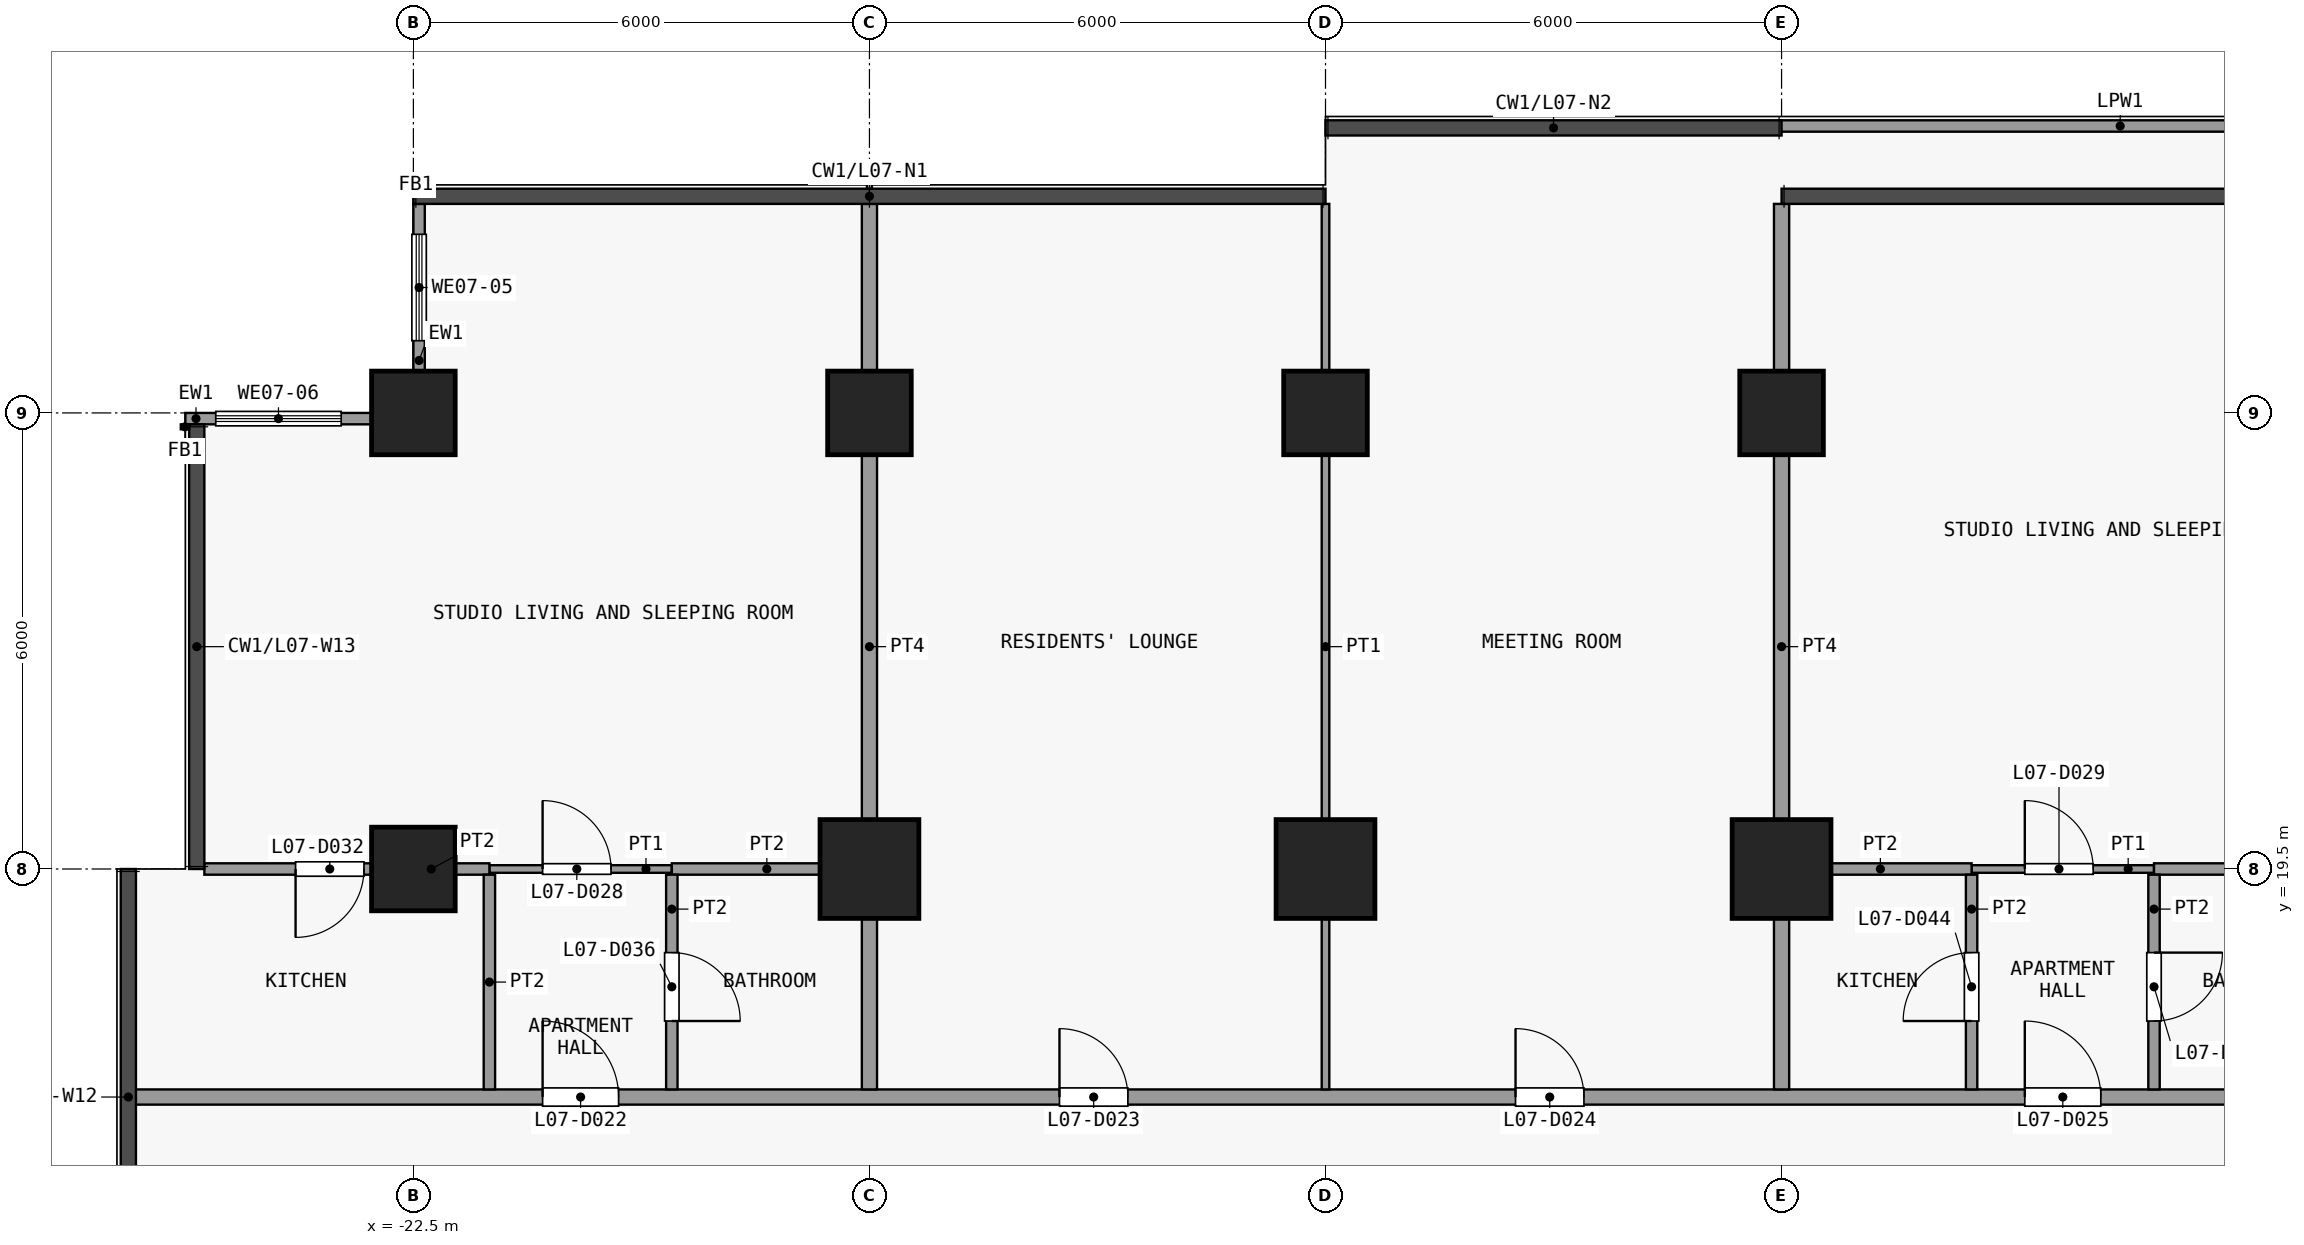
"""IFC4 building model, lengths in metres.
Left out: names, types, materials, properties, quantities, classifications, styles, units other than length and angle.
Written with IfcOpenShell. Run it as: python <this file> out.ifc"""

import sys

from ifc_helpers import new_model, si_unit, direction, frame, frame_2d, origin, origin_2d, place, context, subcontext, project, spatial, rectangle, extrude, element, fill, save


model = new_model("IFC4")
c1 = context("Model", 3, precision=1e-05, world=origin(), true_north=direction((0.0, 1.0)))
c2 = subcontext(c1, "Body", "Model", "MODEL_VIEW")
j1 = project(units=[si_unit("LENGTHUNIT", "METRE"), si_unit("PLANEANGLEUNIT", "RADIAN")], contexts=[c1])
p1 = place(None, origin())
s1 = spatial("IfcSite", under=j1, at=p1, CompositionType="ELEMENT")
p2 = place(p1, origin())
s2 = spatial("IfcBuilding", under=s1, at=p2, CompositionType="ELEMENT")
p3 = place(p2, frame((0.0, 0.0, 36.1)))
s3 = spatial("IfcBuildingStorey", under=s2, at=p3, CompositionType="ELEMENT", Elevation=36.1)
for number, where, z_axis, x_axis in (
    (1, (-22.5, 19.5, 0.0), (0.0, 0.0, 1.0), (1.0, 0.0, 0.0)),
    (2, (-22.5, 25.5, 0.0), (0.0, 0.0, 1.0), (1.0, 0.0, 0.0)),
):
    element("IfcColumn", number, at=place(p3, frame(where, z_axis=z_axis, x_axis=x_axis)), inside=s3, PredefinedType="COLUMN", context=c2, shape_type="SweptSolid", body=[
        extrude(rectangle(XDim=1.1, YDim=1.1, at=origin_2d()), origin(), (0.0, 0.0, 1.0), 3.6),
    ])
p4 = place(p3, frame((-16.5, 19.5, 0.0), z_axis=(0.0, 0.0, 1.0), x_axis=(1.0, 0.0, 0.0)))
e3 = element("IfcColumn", 3, at=p4, inside=s3, PredefinedType="COLUMN", context=c2, shape_type="SweptSolid", body=[
    extrude(rectangle(XDim=1.3, YDim=1.3, at=origin_2d()), origin(), (0.0, 0.0, 1.0), 3.6),
])
p5 = place(p3, frame((-16.5, 25.5, 0.0), z_axis=(0.0, 0.0, 1.0), x_axis=(1.0, 0.0, 0.0)))
e4 = element("IfcColumn", 4, at=p5, inside=s3, PredefinedType="COLUMN", context=c2, shape_type="SweptSolid", body=[
    extrude(rectangle(XDim=1.1, YDim=1.1, at=origin_2d()), origin(), (0.0, 0.0, 1.0), 3.6),
])
p6 = place(p3, frame((-10.5, 19.5, 0.0), z_axis=(0.0, 0.0, 1.0), x_axis=(1.0, 0.0, 0.0)))
e5 = element("IfcColumn", 5, at=p6, inside=s3, PredefinedType="COLUMN", context=c2, shape_type="SweptSolid", body=[
    extrude(rectangle(XDim=1.3, YDim=1.3, at=origin_2d()), origin(), (0.0, 0.0, 1.0), 3.6),
])
p7 = place(p3, frame((-10.5, 25.5, 0.0), z_axis=(0.0, 0.0, 1.0), x_axis=(1.0, 0.0, 0.0)))
e6 = element("IfcColumn", 6, at=p7, inside=s3, PredefinedType="COLUMN", context=c2, shape_type="SweptSolid", body=[
    extrude(rectangle(XDim=1.1, YDim=1.1, at=origin_2d()), origin(), (0.0, 0.0, 1.0), 3.6),
])
p8 = place(p3, frame((-4.5, 19.5, 0.0), z_axis=(0.0, 0.0, 1.0), x_axis=(1.0, 0.0, 0.0)))
e7 = element("IfcColumn", 7, at=p8, inside=s3, PredefinedType="COLUMN", context=c2, shape_type="SweptSolid", body=[
    extrude(rectangle(XDim=1.3, YDim=1.3, at=origin_2d()), origin(), (0.0, 0.0, 1.0), 3.6),
])
p9 = place(p3, frame((-4.5, 25.5, 0.0), z_axis=(0.0, 0.0, 1.0), x_axis=(1.0, 0.0, 0.0)))
e8 = element("IfcColumn", 8, at=p9, inside=s3, PredefinedType="COLUMN", context=c2, shape_type="SweptSolid", body=[
    extrude(rectangle(XDim=1.1, YDim=1.1, at=origin_2d()), origin(), (0.0, 0.0, 1.0), 3.6),
])
p10 = place(p3, frame((-22.425, 26.05, 0.0), z_axis=(0.0, 0.0, 1.0), x_axis=(0.0, 1.0, 0.0)))
e9 = element("IfcWall", 9, at=p10, inside=s3, PredefinedType="SOLIDWALL", context=c2, shape_type="SweptSolid", body=[
    extrude(rectangle(XDim=2.2, YDim=0.15, at=frame_2d((1.1, 0.0))), origin(), (0.0, 0.0, 1.0), 3.3),
])
p11 = place(p10, frame((0.4, 0.0, 0.9)))
e10 = element("IfcOpeningElement", 10, at=p11, cuts=e9, PredefinedType="OPENING", context=c2, shape_type="SweptSolid", body=[
    extrude(rectangle(XDim=1.4, YDim=2.4, at=frame_2d((0.7, 1.2))), frame((0.0, 0.085, 0.0), z_axis=(0.0, -1.0, 0.0), x_axis=(1.0, 0.0, 0.0)), (0.0, 0.0, 1.0), 0.17),
])
p12 = place(p3, frame((-25.5, 25.425, 0.0), z_axis=(0.0, 0.0, 1.0), x_axis=(1.0, 0.0, 0.0)))
e11 = element("IfcWall", 11, at=p12, inside=s3, PredefinedType="SOLIDWALL", context=c2, shape_type="SweptSolid", body=[
    extrude(rectangle(XDim=2.45, YDim=0.15, at=frame_2d((1.225, 0.0))), origin(), (0.0, 0.0, 1.0), 3.3),
])
p13 = place(p12, frame((0.4, 0.0, 0.9)))
e12 = element("IfcOpeningElement", 12, at=p13, cuts=e11, PredefinedType="OPENING", context=c2, shape_type="SweptSolid", body=[
    extrude(rectangle(XDim=1.65, YDim=2.4, at=frame_2d((0.825, 1.2))), frame((0.0, 0.085, 0.0), z_axis=(0.0, -1.0, 0.0), x_axis=(1.0, 0.0, 0.0)), (0.0, 0.0, 1.0), 0.17),
])
p14 = place(p3, frame((-4.54, 29.275, 0.0), z_axis=(0.0, 0.0, 1.0), x_axis=(1.0, 0.0, 0.0)))
e13 = element("IfcWall", 13, at=p14, inside=s3, PredefinedType="PARAPET", context=c2, shape_type="SweptSolid", body=[
    extrude(rectangle(XDim=8.99, YDim=0.15, at=frame_2d((4.495, 0.0))), origin(), (0.0, 0.0, 1.0), 1.15),
])
p15 = place(p3, frame((-26.25, 16.5, 0.0), z_axis=(0.0, 0.0, 1.0), x_axis=(1.0, 0.0, 0.0)))
e14 = element("IfcWall", 14, at=p15, inside=s3, PredefinedType="PARTITIONING", context=c2, shape_type="SweptSolid", body=[
    extrude(rectangle(XDim=51.6, YDim=0.2, at=frame_2d((25.8, 0.0))), origin(), (0.0, 0.0, 1.0), 3.3),
])
p16 = place(p15, frame((5.45, 0.0, 0.0)))
e15 = element("IfcOpeningElement", 15, at=p16, cuts=e14, PredefinedType="OPENING", context=c2, shape_type="SweptSolid", body=[
    extrude(rectangle(XDim=1.0, YDim=2.1, at=frame_2d((0.5, 1.05))), frame((0.0, 0.11, 0.0), z_axis=(0.0, -1.0, 0.0), x_axis=(1.0, 0.0, 0.0)), (0.0, 0.0, 1.0), 0.22),
])
p17 = place(p15, frame((12.25, 0.0, 0.0)))
e16 = element("IfcOpeningElement", 16, at=p17, cuts=e14, PredefinedType="OPENING", context=c2, shape_type="SweptSolid", body=[
    extrude(rectangle(XDim=0.9, YDim=2.1, at=frame_2d((0.45, 1.05))), frame((0.0, 0.11, 0.0), z_axis=(0.0, -1.0, 0.0), x_axis=(1.0, 0.0, 0.0)), (0.0, 0.0, 1.0), 0.22),
])
p18 = place(p15, frame((18.25, 0.0, 0.0)))
e17 = element("IfcOpeningElement", 17, at=p18, cuts=e14, PredefinedType="OPENING", context=c2, shape_type="SweptSolid", body=[
    extrude(rectangle(XDim=0.9, YDim=2.1, at=frame_2d((0.45, 1.05))), frame((0.0, 0.11, 0.0), z_axis=(0.0, -1.0, 0.0), x_axis=(1.0, 0.0, 0.0)), (0.0, 0.0, 1.0), 0.22),
])
p19 = place(p15, frame((24.95, 0.0, 0.0)))
e18 = element("IfcOpeningElement", 18, at=p19, cuts=e14, PredefinedType="OPENING", context=c2, shape_type="SweptSolid", body=[
    extrude(rectangle(XDim=1.0, YDim=2.1, at=frame_2d((0.5, 1.05))), frame((0.0, 0.11, 0.0), z_axis=(0.0, -1.0, 0.0), x_axis=(1.0, 0.0, 0.0)), (0.0, 0.0, 1.0), 0.22),
])
p20 = place(p15, frame((31.45, 0.0, 0.0)))
e19 = element("IfcOpeningElement", 19, at=p20, cuts=e14, PredefinedType="OPENING", context=c2, shape_type="SweptSolid", body=[
    extrude(rectangle(XDim=1.0, YDim=2.1, at=frame_2d((0.5, 1.05))), frame((0.0, 0.11, 0.0), z_axis=(0.0, -1.0, 0.0), x_axis=(1.0, 0.0, 0.0)), (0.0, 0.0, 1.0), 0.22),
])
p21 = place(p15, frame((43.45, 0.0, 0.0)))
e20 = element("IfcOpeningElement", 20, at=p21, cuts=e14, PredefinedType="OPENING", context=c2, shape_type="SweptSolid", body=[
    extrude(rectangle(XDim=1.0, YDim=2.1, at=frame_2d((0.5, 1.05))), frame((0.0, 0.11, 0.0), z_axis=(0.0, -1.0, 0.0), x_axis=(1.0, 0.0, 0.0)), (0.0, 0.0, 1.0), 0.22),
])
p22 = place(p3, frame((-21.5, 19.5, 0.0), z_axis=(0.0, 0.0, 1.0), x_axis=(1.0, 0.0, 0.0)))
e21 = element("IfcWall", 21, at=p22, inside=s3, PredefinedType="PARTITIONING", context=c2, shape_type="SweptSolid", body=[
    extrude(rectangle(XDim=2.4, YDim=0.1, at=frame_2d((1.2, 0.0))), origin(), (0.0, 0.0, 1.0), 3.3),
])
p23 = place(p22, frame((0.7, 0.0, 0.0)))
e22 = element("IfcOpeningElement", 22, at=p23, cuts=e21, PredefinedType="OPENING", context=c2, shape_type="SweptSolid", body=[
    extrude(rectangle(XDim=0.9, YDim=2.1, at=frame_2d((0.45, 1.05))), frame((0.0, 0.06, 0.0), z_axis=(0.0, -1.0, 0.0), x_axis=(1.0, 0.0, 0.0)), (0.0, 0.0, 1.0), 0.12),
])
p24 = place(p3, frame((-2.0, 19.5, 0.0), z_axis=(0.0, 0.0, 1.0), x_axis=(1.0, 0.0, 0.0)))
e23 = element("IfcWall", 23, at=p24, inside=s3, PredefinedType="PARTITIONING", context=c2, shape_type="SweptSolid", body=[
    extrude(rectangle(XDim=2.4, YDim=0.1, at=frame_2d((1.2, 0.0))), origin(), (0.0, 0.0, 1.0), 3.3),
])
p25 = place(p24, frame((0.7, 0.0, 0.0)))
e24 = element("IfcOpeningElement", 24, at=p25, cuts=e23, PredefinedType="OPENING", context=c2, shape_type="SweptSolid", body=[
    extrude(rectangle(XDim=0.9, YDim=2.1, at=frame_2d((0.45, 1.05))), frame((0.0, 0.06, 0.0), z_axis=(0.0, -1.0, 0.0), x_axis=(1.0, 0.0, 0.0)), (0.0, 0.0, 1.0), 0.12),
])
p26 = place(p3, frame((-25.25, 19.5, 0.0), z_axis=(0.0, 0.0, 1.0), x_axis=(1.0, 0.0, 0.0)))
e25 = element("IfcWall", 25, at=p26, inside=s3, PredefinedType="PARTITIONING", context=c2, shape_type="SweptSolid", body=[
    extrude(rectangle(XDim=3.75, YDim=0.15, at=frame_2d((1.875, 0.0))), origin(), (0.0, 0.0, 1.0), 3.3),
])
p27 = place(p26, frame((1.2, 0.0, 0.0)))
e26 = element("IfcOpeningElement", 26, at=p27, cuts=e25, PredefinedType="OPENING", context=c2, shape_type="SweptSolid", body=[
    extrude(rectangle(XDim=0.9, YDim=2.1, at=frame_2d((0.45, 1.05))), frame((0.0, 0.085, 0.0), z_axis=(0.0, -1.0, 0.0), x_axis=(1.0, 0.0, 0.0)), (0.0, 0.0, 1.0), 0.17),
])
p28 = place(p3, frame((-19.1, 19.5, 0.0), z_axis=(0.0, 0.0, 1.0), x_axis=(1.0, 0.0, 0.0)))
e27 = element("IfcWall", 27, at=p28, inside=s3, PredefinedType="PARTITIONING", context=c2, shape_type="SweptSolid", body=[
    extrude(rectangle(XDim=2.5, YDim=0.15, at=frame_2d((1.25, 0.0))), origin(), (0.0, 0.0, 1.0), 3.3),
])
p29 = place(p3, frame((-4.4, 19.5, 0.0), z_axis=(0.0, 0.0, 1.0), x_axis=(1.0, 0.0, 0.0)))
e28 = element("IfcWall", 28, at=p29, inside=s3, PredefinedType="PARTITIONING", context=c2, shape_type="SweptSolid", body=[
    extrude(rectangle(XDim=2.4, YDim=0.15, at=frame_2d((1.2, 0.0))), origin(), (0.0, 0.0, 1.0), 3.3),
])
p30 = place(p3, frame((0.4, 19.5, 0.0), z_axis=(0.0, 0.0, 1.0), x_axis=(1.0, 0.0, 0.0)))
e29 = element("IfcWall", 29, at=p30, inside=s3, PredefinedType="PARTITIONING", context=c2, shape_type="SweptSolid", body=[
    extrude(rectangle(XDim=4.1, YDim=0.15, at=frame_2d((2.05, 0.0))), origin(), (0.0, 0.0, 1.0), 3.3),
])
p31 = place(p3, frame((-21.5, 16.6, 0.0), z_axis=(0.0, 0.0, 1.0), x_axis=(0.0, 1.0, 0.0)))
e30 = element("IfcWall", 30, at=p31, inside=s3, PredefinedType="PARTITIONING", context=c2, shape_type="SweptSolid", body=[
    extrude(rectangle(XDim=2.825, YDim=0.15, at=frame_2d((1.413, 0.0))), origin(), (0.0, 0.0, 1.0), 3.3),
])
p32 = place(p3, frame((-19.1, 16.6, 0.0), z_axis=(0.0, 0.0, 1.0), x_axis=(0.0, 1.0, 0.0)))
e31 = element("IfcWall", 31, at=p32, inside=s3, PredefinedType="PARTITIONING", context=c2, shape_type="SweptSolid", body=[
    extrude(rectangle(XDim=2.825, YDim=0.15, at=frame_2d((1.413, 0.0))), origin(), (0.0, 0.0, 1.0), 3.3),
])
p33 = place(p32, frame((0.9, 0.0, 0.0)))
e32 = element("IfcOpeningElement", 32, at=p33, cuts=e31, PredefinedType="OPENING", context=c2, shape_type="SweptSolid", body=[
    extrude(rectangle(XDim=0.9, YDim=2.1, at=frame_2d((0.45, 1.05))), frame((0.0, 0.085, 0.0), z_axis=(0.0, -1.0, 0.0), x_axis=(1.0, 0.0, 0.0)), (0.0, 0.0, 1.0), 0.17),
])
p34 = place(p3, frame((-16.5, 16.6, 0.0), z_axis=(0.0, 0.0, 1.0), x_axis=(0.0, 1.0, 0.0)))
e33 = element("IfcWall", 33, at=p34, inside=s3, PredefinedType="PARTITIONING", context=c2, shape_type="SweptSolid", body=[
    extrude(rectangle(XDim=11.65, YDim=0.2, at=frame_2d((5.825, 0.0))), origin(), (0.0, 0.0, 1.0), 3.3),
])
p35 = place(p3, frame((-10.5, 16.6, 0.0), z_axis=(0.0, 0.0, 1.0), x_axis=(0.0, 1.0, 0.0)))
e34 = element("IfcWall", 34, at=p35, inside=s3, PredefinedType="PARTITIONING", context=c2, shape_type="SweptSolid", body=[
    extrude(rectangle(XDim=11.65, YDim=0.1, at=frame_2d((5.825, 0.0))), origin(), (0.0, 0.0, 1.0), 3.3),
])
p36 = place(p3, frame((-4.5, 16.6, 0.0), z_axis=(0.0, 0.0, 1.0), x_axis=(0.0, 1.0, 0.0)))
e35 = element("IfcWall", 35, at=p36, inside=s3, PredefinedType="PARTITIONING", context=c2, shape_type="SweptSolid", body=[
    extrude(rectangle(XDim=11.65, YDim=0.2, at=frame_2d((5.825, 0.0))), origin(), (0.0, 0.0, 1.0), 3.3),
])
p37 = place(p3, frame((-2.0, 16.6, 0.0), z_axis=(0.0, 0.0, 1.0), x_axis=(0.0, 1.0, 0.0)))
e36 = element("IfcWall", 36, at=p37, inside=s3, PredefinedType="PARTITIONING", context=c2, shape_type="SweptSolid", body=[
    extrude(rectangle(XDim=2.825, YDim=0.15, at=frame_2d((1.413, 0.0))), origin(), (0.0, 0.0, 1.0), 3.3),
])
p38 = place(p37, frame((0.9, 0.0, 0.0)))
e37 = element("IfcOpeningElement", 37, at=p38, cuts=e36, PredefinedType="OPENING", context=c2, shape_type="SweptSolid", body=[
    extrude(rectangle(XDim=0.9, YDim=2.1, at=frame_2d((0.45, 1.05))), frame((0.0, 0.085, 0.0), z_axis=(0.0, -1.0, 0.0), x_axis=(1.0, 0.0, 0.0)), (0.0, 0.0, 1.0), 0.17),
])
p39 = place(p3, frame((0.4, 16.6, 0.0), z_axis=(0.0, 0.0, 1.0), x_axis=(0.0, 1.0, 0.0)))
e38 = element("IfcWall", 38, at=p39, inside=s3, PredefinedType="PARTITIONING", context=c2, shape_type="SweptSolid", body=[
    extrude(rectangle(XDim=2.825, YDim=0.15, at=frame_2d((1.413, 0.0))), origin(), (0.0, 0.0, 1.0), 3.3),
])
p40 = place(p39, frame((0.9, 0.0, 0.0)))
e39 = element("IfcOpeningElement", 39, at=p40, cuts=e38, PredefinedType="OPENING", context=c2, shape_type="SweptSolid", body=[
    extrude(rectangle(XDim=0.9, YDim=2.1, at=frame_2d((0.45, 1.05))), frame((0.0, 0.085, 0.0), z_axis=(0.0, -1.0, 0.0), x_axis=(1.0, 0.0, 0.0)), (0.0, 0.0, 1.0), 0.17),
])
p41 = place(p11, origin())
e40 = element("IfcWindow", 40, at=p41, inside=s3, PartitioningType="SINGLE_PANEL", PredefinedType="WINDOW", context=c2, shape_type="SweptSolid", body=[
    extrude(rectangle(XDim=1.4, YDim=2.4, at=frame_2d((0.7, 1.2))), frame((0.0, 0.03, 0.0), z_axis=(0.0, -1.0, 0.0), x_axis=(1.0, 0.0, 0.0)), (0.0, 0.0, 1.0), 0.06),
])
fill(e10, e40)
p42 = place(p13, origin())
e41 = element("IfcWindow", 41, at=p42, inside=s3, PartitioningType="SINGLE_PANEL", PredefinedType="WINDOW", context=c2, shape_type="SweptSolid", body=[
    extrude(rectangle(XDim=1.65, YDim=2.4, at=frame_2d((0.825, 1.2))), frame((0.0, 0.03, 0.0), z_axis=(0.0, -1.0, 0.0), x_axis=(1.0, 0.0, 0.0)), (0.0, 0.0, 1.0), 0.06),
])
fill(e12, e41)
p43 = place(p16, origin())
e42 = element("IfcDoor", 42, at=p43, inside=s3, OperationType="SINGLE_SWING_RIGHT", PredefinedType="DOOR", context=c2, shape_type="SweptSolid", body=[
    extrude(rectangle(XDim=1.0, YDim=2.1, at=frame_2d((0.5, 1.05))), frame((0.0, 0.025, 0.0), z_axis=(0.0, -1.0, 0.0), x_axis=(1.0, 0.0, 0.0)), (0.0, 0.0, 1.0), 0.05),
])
fill(e15, e42)
p44 = place(p17, origin())
e43 = element("IfcDoor", 43, at=p44, inside=s3, OperationType="SINGLE_SWING_RIGHT", PredefinedType="DOOR", context=c2, shape_type="SweptSolid", body=[
    extrude(rectangle(XDim=0.9, YDim=2.1, at=frame_2d((0.45, 1.05))), frame((0.0, 0.025, 0.0), z_axis=(0.0, -1.0, 0.0), x_axis=(1.0, 0.0, 0.0)), (0.0, 0.0, 1.0), 0.05),
])
fill(e16, e43)
p45 = place(p18, origin())
e44 = element("IfcDoor", 44, at=p45, inside=s3, OperationType="SINGLE_SWING_RIGHT", PredefinedType="DOOR", context=c2, shape_type="SweptSolid", body=[
    extrude(rectangle(XDim=0.9, YDim=2.1, at=frame_2d((0.45, 1.05))), frame((0.0, 0.025, 0.0), z_axis=(0.0, -1.0, 0.0), x_axis=(1.0, 0.0, 0.0)), (0.0, 0.0, 1.0), 0.05),
])
fill(e17, e44)
p46 = place(p19, origin())
e45 = element("IfcDoor", 45, at=p46, inside=s3, OperationType="SINGLE_SWING_RIGHT", PredefinedType="DOOR", context=c2, shape_type="SweptSolid", body=[
    extrude(rectangle(XDim=1.0, YDim=2.1, at=frame_2d((0.5, 1.05))), frame((0.0, 0.025, 0.0), z_axis=(0.0, -1.0, 0.0), x_axis=(1.0, 0.0, 0.0)), (0.0, 0.0, 1.0), 0.05),
])
fill(e18, e45)
p47 = place(p23, origin())
e46 = element("IfcDoor", 46, at=p47, inside=s3, OperationType="SINGLE_SWING_RIGHT", PredefinedType="DOOR", context=c2, shape_type="SweptSolid", body=[
    extrude(rectangle(XDim=0.9, YDim=2.1, at=frame_2d((0.45, 1.05))), frame((0.0, 0.025, 0.0), z_axis=(0.0, -1.0, 0.0), x_axis=(1.0, 0.0, 0.0)), (0.0, 0.0, 1.0), 0.05),
])
fill(e22, e46)
p48 = place(p25, origin())
e47 = element("IfcDoor", 47, at=p48, inside=s3, OperationType="SINGLE_SWING_RIGHT", PredefinedType="DOOR", context=c2, shape_type="SweptSolid", body=[
    extrude(rectangle(XDim=0.9, YDim=2.1, at=frame_2d((0.45, 1.05))), frame((0.0, 0.025, 0.0), z_axis=(0.0, -1.0, 0.0), x_axis=(1.0, 0.0, 0.0)), (0.0, 0.0, 1.0), 0.05),
])
fill(e24, e47)
p49 = place(p27, origin())
e48 = element("IfcDoor", 48, at=p49, inside=s3, OperationType="SINGLE_SWING_LEFT", PredefinedType="DOOR", context=c2, shape_type="SweptSolid", body=[
    extrude(rectangle(XDim=0.9, YDim=2.1, at=frame_2d((0.45, 1.05))), frame((0.0, 0.025, 0.0), z_axis=(0.0, -1.0, 0.0), x_axis=(1.0, 0.0, 0.0)), (0.0, 0.0, 1.0), 0.05),
])
fill(e26, e48)
p50 = place(p33, origin())
e49 = element("IfcDoor", 49, at=p50, inside=s3, OperationType="SINGLE_SWING_LEFT", PredefinedType="DOOR", context=c2, shape_type="SweptSolid", body=[
    extrude(rectangle(XDim=0.9, YDim=2.1, at=frame_2d((0.45, 1.05))), frame((0.0, 0.025, 0.0), z_axis=(0.0, -1.0, 0.0), x_axis=(1.0, 0.0, 0.0)), (0.0, 0.0, 1.0), 0.05),
])
fill(e32, e49)
p51 = place(p38, origin())
e50 = element("IfcDoor", 50, at=p51, inside=s3, OperationType="SINGLE_SWING_RIGHT", PredefinedType="DOOR", context=c2, shape_type="SweptSolid", body=[
    extrude(rectangle(XDim=0.9, YDim=2.1, at=frame_2d((0.45, 1.05))), frame((0.0, 0.025, 0.0), z_axis=(0.0, -1.0, 0.0), x_axis=(1.0, 0.0, 0.0)), (0.0, 0.0, 1.0), 0.05),
])
fill(e37, e50)
p52 = place(p40, origin())
e51 = element("IfcDoor", 51, at=p52, inside=s3, OperationType="SINGLE_SWING_RIGHT", PredefinedType="DOOR", context=c2, shape_type="SweptSolid", body=[
    extrude(rectangle(XDim=0.9, YDim=2.1, at=frame_2d((0.45, 1.05))), frame((0.0, 0.025, 0.0), z_axis=(0.0, -1.0, 0.0), x_axis=(1.0, 0.0, 0.0)), (0.0, 0.0, 1.0), 0.05),
])
fill(e39, e51)
save(model, sys.argv[1])
